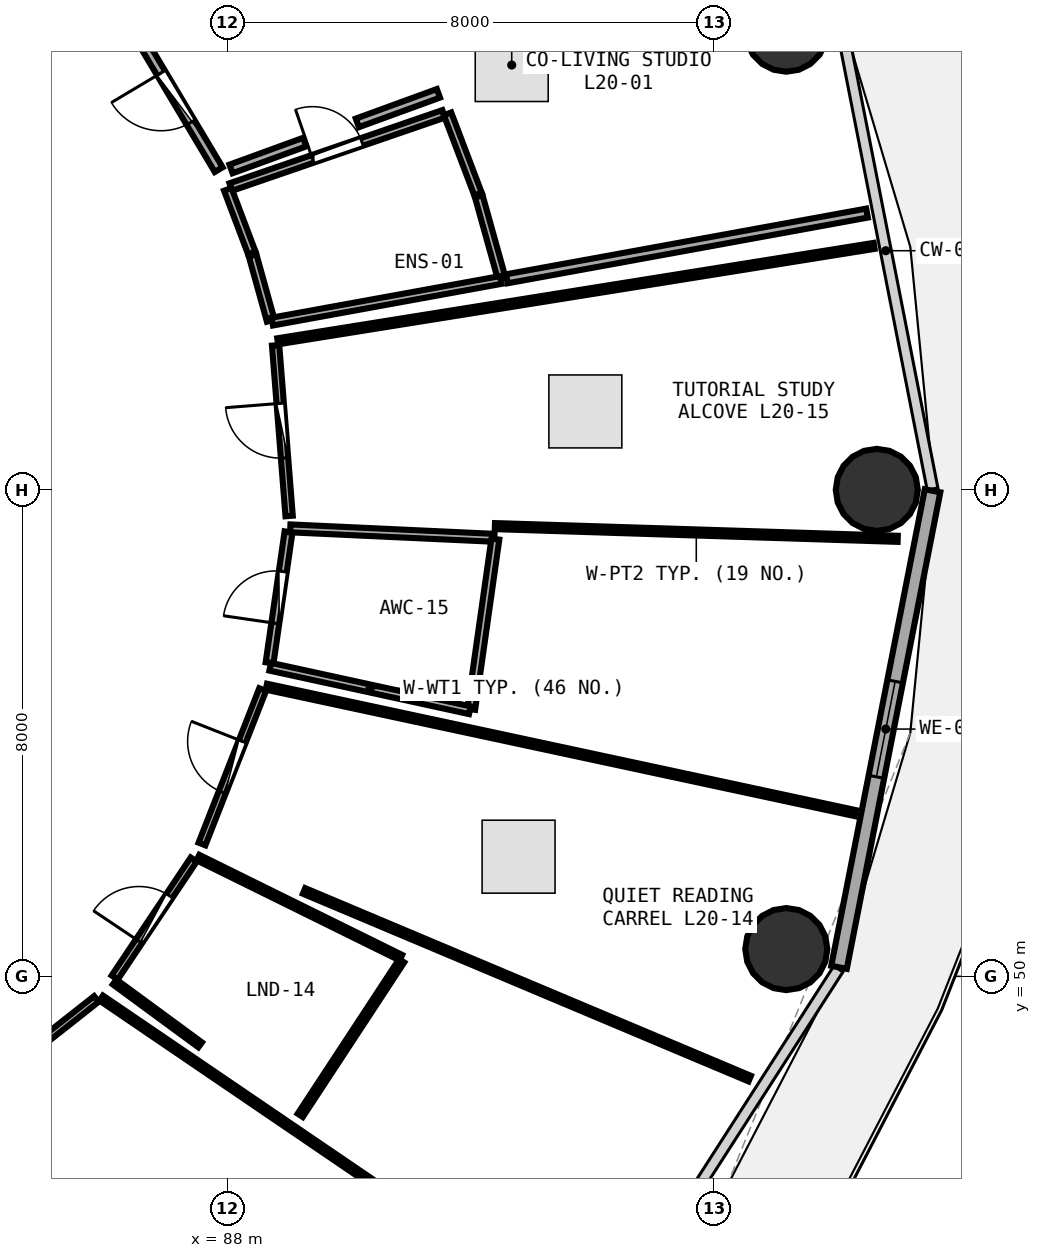
"""IFC4 building model, lengths in metres.
Left out: names, types, materials, properties, quantities, classifications, styles, units other than length and angle.
Written with IfcOpenShell. Run it as: python <this file> out.ifc"""

import sys

from ifc_helpers import new_model, si_unit, direction, frame, frame_2d, origin, origin_2d, place, context, subcontext, project, spatial, rectangle, circle, extrude, element, fill, save


model = new_model("IFC4")
c1 = context("Model", 3, precision=1e-05, world=origin(), true_north=direction((0.0, 1.0)))
c2 = subcontext(c1, "Body", "Model", "MODEL_VIEW")
j1 = project(units=[si_unit("LENGTHUNIT", "METRE"), si_unit("PLANEANGLEUNIT", "RADIAN")], contexts=[c1])
p1 = place(None, origin())
s1 = spatial("IfcSite", under=j1, at=p1, CompositionType="ELEMENT")
p2 = place(p1, origin())
s2 = spatial("IfcBuilding", under=s1, at=p2, CompositionType="ELEMENT")
p3 = place(p2, frame((0.0, 0.0, 80.1)))
s3 = spatial("IfcBuildingStorey", under=s2, at=p3, CompositionType="ELEMENT", Elevation=80.1)
for number, where, z_axis, x_axis in (
    (1, (98.68, 58.0, 0.0), (0.0, 0.0, 1.0), (1.0, 0.0, 0.0)),
    (2, (97.192, 65.552, 0.0), (0.0, 0.0, 1.0), (1.0, 0.0, 0.0)),
    (3, (97.192, 50.448, 0.0), (0.0, 0.0, 1.0), (1.0, 0.0, 0.0)),
):
    element("IfcColumn", number, at=place(p3, frame(where, z_axis=z_axis, x_axis=x_axis)), inside=s3, PredefinedType="COLUMN", context=c2, shape_type="SweptSolid", body=[
        extrude(circle(Radius=0.675, at=origin_2d()), origin(), (0.0, 0.0, 1.0), 3.75),
    ])
p4 = place(p3, frame((98.059, 50.148, 0.0), z_axis=(0.0, 0.0, 1.0), x_axis=(0.192581843632, 0.981280914674, 0.0)))
e4 = element("IfcWall", 4, at=p4, inside=s3, PredefinedType="SOLIDWALL", context=c2, shape_type="SweptSolid", body=[
    extrude(rectangle(XDim=7.987, YDim=0.26, at=frame_2d((3.993, 0.0))), origin(), (0.0, 0.0, 1.0), 3.475),
])
p5 = place(p4, frame((3.193, 0.0, 0.85)))
e5 = element("IfcOpeningElement", 5, at=p5, cuts=e4, PredefinedType="OPENING", context=c2, shape_type="SweptSolid", body=[
    extrude(rectangle(XDim=1.6, YDim=1.45, at=frame_2d((0.8, 0.725))), frame((0.0, 0.14, 0.0), z_axis=(0.0, -1.0, 0.0), x_axis=(1.0, 0.0, 0.0)), (0.0, 0.0, 1.0), 0.28),
])
p6 = place(p3, frame((88.056, 62.98, 0.0), z_axis=(0.0, 0.0, 1.0), x_axis=(0.94570750663, 0.325018940838, 0.0)))
e6 = element("IfcWall", 6, at=p6, inside=s3, PredefinedType="PLUMBINGWALL", context=c2, shape_type="SweptSolid", body=[
    extrude(rectangle(XDim=3.702, YDim=0.13, at=frame_2d((1.851, 0.0))), origin(), (0.0, 0.0, 1.0), 3.175),
])
p7 = place(p6, frame((1.421, 0.0, 0.0)))
e7 = element("IfcOpeningElement", 7, at=p7, cuts=e6, PredefinedType="OPENING", context=c2, shape_type="SweptSolid", body=[
    extrude(rectangle(XDim=0.86, YDim=2.05, at=frame_2d((0.43, 1.025))), frame((0.0, 0.075, 0.0), z_axis=(0.0, -1.0, 0.0), x_axis=(1.0, 0.0, 0.0)), (0.0, 0.0, 1.0), 0.15),
])
p8 = place(p3, frame((87.856, 63.267, 0.0), z_axis=(0.0, 0.0, 1.0), x_axis=(-0.512288635556, 0.858813340535, 0.0)))
e8 = element("IfcWall", 8, at=p8, inside=s3, PredefinedType="PARTITIONING", context=c2, shape_type="SweptSolid", body=[
    extrude(rectangle(XDim=2.751, YDim=0.15, at=frame_2d((1.375, 0.0))), origin(), (0.0, 0.0, 1.0), 2.925),
])
p9 = place(p8, frame((0.901, 0.0, 0.0)))
e9 = element("IfcOpeningElement", 9, at=p9, cuts=e8, PredefinedType="OPENING", context=c2, shape_type="SweptSolid", body=[
    extrude(rectangle(XDim=0.95, YDim=2.08, at=frame_2d((0.475, 1.04))), frame((0.0, 0.085, 0.0), z_axis=(0.0, -1.0, 0.0), x_axis=(1.0, 0.0, 0.0)), (0.0, 0.0, 1.0), 0.17),
])
p10 = place(p3, frame((81.494, 46.198, 0.0), z_axis=(0.0, 0.0, 1.0), x_axis=(0.785315722545, 0.619095482074, 0.0)))
e10 = element("IfcWall", 10, at=p10, inside=s3, PredefinedType="PARTITIONING", context=c2, shape_type="SweptSolid", body=[
    extrude(rectangle(XDim=5.54, YDim=0.12, at=frame_2d((2.77, 0.0))), origin(), (0.0, 0.0, 1.0), 2.925),
])
p11 = place(p10, frame((2.32, 0.0, 0.0)))
e11 = element("IfcOpeningElement", 11, at=p11, cuts=e10, PredefinedType="OPENING", context=c2, shape_type="SweptSolid", body=[
    extrude(rectangle(XDim=0.9, YDim=2.08, at=frame_2d((0.45, 1.04))), frame((0.0, 0.07, 0.0), z_axis=(0.0, -1.0, 0.0), x_axis=(1.0, 0.0, 0.0)), (0.0, 0.0, 1.0), 0.14),
])
p12 = place(p3, frame((86.146, 49.981, 0.0), z_axis=(0.0, 0.0, 1.0), x_axis=(0.556604342457, 0.83077771152, 0.0)))
e12 = element("IfcWall", 12, at=p12, inside=s3, PredefinedType="PARTITIONING", context=c2, shape_type="SweptSolid", body=[
    extrude(rectangle(XDim=2.336, YDim=0.12, at=frame_2d((1.168, 0.0))), origin(), (0.0, 0.0, 1.0), 2.925),
])
p13 = place(p12, frame((0.718, 0.0, 0.0)))
e13 = element("IfcOpeningElement", 13, at=p13, cuts=e12, PredefinedType="OPENING", context=c2, shape_type="SweptSolid", body=[
    extrude(rectangle(XDim=0.9, YDim=2.08, at=frame_2d((0.45, 1.04))), frame((0.0, 0.07, 0.0), z_axis=(0.0, -1.0, 0.0), x_axis=(1.0, 0.0, 0.0)), (0.0, 0.0, 1.0), 0.14),
])
p14 = place(p3, frame((87.582, 52.177, 0.0), z_axis=(0.0, 0.0, 1.0), x_axis=(0.365846135531, 0.930675348936, 0.0)))
e14 = element("IfcWall", 14, at=p14, inside=s3, PredefinedType="PARTITIONING", context=c2, shape_type="SweptSolid", body=[
    extrude(rectangle(XDim=2.729, YDim=0.12, at=frame_2d((1.364, 0.0))), origin(), (0.0, 0.0, 1.0), 3.235),
])
p15 = place(p14, frame((0.914, 0.0, 0.0)))
e15 = element("IfcOpeningElement", 15, at=p15, cuts=e14, PredefinedType="OPENING", context=c2, shape_type="SweptSolid", body=[
    extrude(rectangle(XDim=0.9, YDim=2.08, at=frame_2d((0.45, 1.04))), frame((0.0, 0.07, 0.0), z_axis=(0.0, -1.0, 0.0), x_axis=(1.0, 0.0, 0.0)), (0.0, 0.0, 1.0), 0.14),
])
p16 = place(p3, frame((88.694, 55.156, 0.0), z_axis=(0.0, 0.0, 1.0), x_axis=(0.14330641518, 0.989678367637, 0.0)))
e16 = element("IfcWall", 16, at=p16, inside=s3, PredefinedType="PLUMBINGWALL", context=c2, shape_type="SweptSolid", body=[
    extrude(rectangle(XDim=2.176, YDim=0.13, at=frame_2d((1.088, 0.0))), origin(), (0.0, 0.0, 1.0), 3.48),
])
p17 = place(p16, frame((0.658, 0.0, 0.0)))
e17 = element("IfcOpeningElement", 17, at=p17, cuts=e16, PredefinedType="OPENING", context=c2, shape_type="SweptSolid", body=[
    extrude(rectangle(XDim=0.86, YDim=2.05, at=frame_2d((0.43, 1.025))), frame((0.0, 0.075, 0.0), z_axis=(0.0, -1.0, 0.0), x_axis=(1.0, 0.0, 0.0)), (0.0, 0.0, 1.0), 0.15),
])
p18 = place(p3, frame((89.015, 57.571, 0.0), z_axis=(0.0, 0.0, 1.0), x_axis=(-0.079090310477, 0.996867454975, 0.0)))
e18 = element("IfcWall", 18, at=p18, inside=s3, PredefinedType="PARTITIONING", context=c2, shape_type="SweptSolid", body=[
    extrude(rectangle(XDim=2.815, YDim=0.12, at=frame_2d((1.408, 0.0))), origin(), (0.0, 0.0, 1.0), 2.925),
])
p19 = place(p18, frame((0.958, 0.0, 0.0)))
e19 = element("IfcOpeningElement", 19, at=p19, cuts=e18, PredefinedType="OPENING", context=c2, shape_type="SweptSolid", body=[
    extrude(rectangle(XDim=0.9, YDim=2.08, at=frame_2d((0.45, 1.04))), frame((0.0, 0.07, 0.0), z_axis=(0.0, -1.0, 0.0), x_axis=(1.0, 0.0, 0.0)), (0.0, 0.0, 1.0), 0.14),
])
p20 = place(p3, frame((88.713, 60.783, 0.0), z_axis=(0.0, 0.0, 1.0), x_axis=(-0.267768177699, 0.963483369349, 0.0)))
e20 = element("IfcWall", 20, at=p20, inside=s3, PredefinedType="PLUMBINGWALL", context=c2, shape_type="SweptSolid", body=[
    extrude(rectangle(XDim=1.114, YDim=0.13, at=frame_2d((0.557, 0.0))), origin(), (0.0, 0.0, 1.0), 3.48),
])
p21 = place(p3, frame((88.402, 61.895, 0.0), z_axis=(0.0, 0.0, 1.0), x_axis=(-0.353392089541, 0.935475296868, 0.0)))
e21 = element("IfcWall", 21, at=p21, inside=s3, PredefinedType="PLUMBINGWALL", context=c2, shape_type="SweptSolid", body=[
    extrude(rectangle(XDim=1.12, YDim=0.13, at=frame_2d((0.56, 0.0))), origin(), (0.0, 0.0, 1.0), 3.235),
])
p22 = place(p3, frame((91.62, 64.184, 0.0), z_axis=(0.0, 0.0, 1.0), x_axis=(0.355383981736, -0.934720399652, 0.0)))
e22 = element("IfcWall", 22, at=p22, inside=s3, PredefinedType="PLUMBINGWALL", context=c2, shape_type="SweptSolid", body=[
    extrude(rectangle(XDim=1.412, YDim=0.13, at=frame_2d((0.706, 0.0))), origin(), (0.0, 0.0, 1.0), 3.48),
])
p23 = place(p3, frame((92.135, 62.827, 0.0), z_axis=(0.0, 0.0, 1.0), x_axis=(0.268855284743, -0.963180583206, 0.0)))
e23 = element("IfcWall", 23, at=p23, inside=s3, PredefinedType="PLUMBINGWALL", context=c2, shape_type="SweptSolid", body=[
    extrude(rectangle(XDim=1.403, YDim=0.13, at=frame_2d((0.702, 0.0))), origin(), (0.0, 0.0, 1.0), 3.48),
])
p24 = place(p3, frame((92.497, 61.452, 0.0), z_axis=(0.0, 0.0, 1.0), x_axis=(-0.983811592037, -0.17920589101, 0.0)))
e24 = element("IfcWall", 24, at=p24, inside=s3, PredefinedType="PLUMBINGWALL", context=c2, shape_type="SweptSolid", body=[
    extrude(rectangle(XDim=3.821, YDim=0.13, at=frame_2d((1.911, 0.0))), origin(), (0.0, 0.0, 1.0), 3.175),
])
p25 = place(p3, frame((98.52, 62.552, 0.0), z_axis=(0.0, 0.0, 1.0), x_axis=(-0.983768558102, -0.17944197973, 0.0)))
e25 = element("IfcWall", 25, at=p25, inside=s3, PredefinedType="PARTITIONING", context=c2, shape_type="SweptSolid", body=[
    extrude(rectangle(XDim=6.022, YDim=0.15, at=frame_2d((3.011, 0.0))), origin(), (0.0, 0.0, 1.0), 2.975),
])
p26 = place(p3, frame((91.47, 64.521, 0.0), z_axis=(0.0, 0.0, 1.0), x_axis=(-0.939526959999, -0.342474950084, 0.0)))
e26 = element("IfcWall", 26, at=p26, inside=s3, PredefinedType="PARTITIONING", context=c2, shape_type="SweptSolid", body=[
    extrude(rectangle(XDim=1.419, YDim=0.15, at=frame_2d((0.71, 0.0))), origin(), (0.0, 0.0, 1.0), 3.175),
])
p27 = place(p3, frame((89.272, 63.72, 0.0), z_axis=(0.0, 0.0, 1.0), x_axis=(-0.939522570491, -0.342486991779, 0.0)))
e27 = element("IfcWall", 27, at=p27, inside=s3, PredefinedType="PARTITIONING", context=c2, shape_type="SweptSolid", body=[
    extrude(rectangle(XDim=1.291, YDim=0.15, at=frame_2d((0.646, 0.0))), origin(), (0.0, 0.0, 1.0), 3.235),
])
p28 = place(p3, frame((85.925, 49.643, 0.0), z_axis=(0.0, 0.0, 1.0), x_axis=(0.826688408753, -0.562659999319, 0.0)))
e28 = element("IfcWall", 28, at=p28, inside=s3, PredefinedType="PARTITIONING", context=c2, shape_type="SweptSolid", body=[
    extrude(rectangle(XDim=9.539, YDim=0.1, at=frame_2d((4.77, 0.0))), origin(), (0.0, 0.0, 1.0), 2.975),
])
p29 = place(p3, frame((87.516, 51.953, 0.0), z_axis=(0.0, 0.0, 1.0), x_axis=(0.896816300292, -0.442403123328, 0.0)))
e29 = element("IfcWall", 29, at=p29, inside=s3, PredefinedType="PARTITIONING", context=c2, shape_type="SweptSolid", body=[
    extrude(rectangle(XDim=3.72, YDim=0.1, at=frame_2d((1.86, 0.0))), origin(), (0.0, 0.0, 1.0), 2.925),
])
p30 = place(p3, frame((90.866, 50.257, 0.0), z_axis=(0.0, 0.0, 1.0), x_axis=(-0.548626626693, -0.836067476035, 0.0)))
e30 = element("IfcWall", 30, at=p30, inside=s3, PredefinedType="PARTITIONING", context=c2, shape_type="SweptSolid", body=[
    extrude(rectangle(XDim=3.041, YDim=0.1, at=frame_2d((1.521, 0.0))), origin(), (0.0, 0.0, 1.0), 3.175),
])
p31 = place(p3, frame((87.552, 48.874, 0.0), z_axis=(0.0, 0.0, 1.0), x_axis=(-0.805902241708, 0.592048627065, 0.0)))
e31 = element("IfcWall", 31, at=p31, inside=s3, PredefinedType="PARTITIONING", context=c2, shape_type="SweptSolid", body=[
    extrude(rectangle(XDim=1.746, YDim=0.1, at=frame_2d((0.873, 0.0))), origin(), (0.0, 0.0, 1.0), 3.235),
])
p32 = place(p3, frame((88.641, 54.764, 0.0), z_axis=(0.0, 0.0, 1.0), x_axis=(0.97772336182, -0.209897660187, 0.0)))
e32 = element("IfcWall", 32, at=p32, inside=s3, PredefinedType="PARTITIONING", context=c2, shape_type="SweptSolid", body=[
    extrude(rectangle(XDim=9.906, YDim=0.1, at=frame_2d((4.953, 0.0))), origin(), (0.0, 0.0, 1.0), 2.975),
])
p33 = place(p3, frame((96.59, 48.319, 0.0), z_axis=(0.0, 0.0, 1.0), x_axis=(-0.92163364156, 0.388061117279, 0.0)))
e33 = element("IfcWall", 33, at=p33, inside=s3, PredefinedType="PARTITIONING", context=c2, shape_type="SweptSolid", body=[
    extrude(rectangle(XDim=7.953, YDim=0.1, at=frame_2d((3.977, 0.0))), origin(), (0.0, 0.0, 1.0), 2.925),
])
p34 = place(p3, frame((89.034, 57.367, 0.0), z_axis=(0.0, 0.0, 1.0), x_axis=(0.998931351305, -0.046218560994, 0.0)))
e34 = element("IfcWall", 34, at=p34, inside=s3, PredefinedType="PLUMBINGWALL", context=c2, shape_type="SweptSolid", body=[
    extrude(rectangle(XDim=3.36, YDim=0.13, at=frame_2d((1.68, 0.0))), origin(), (0.0, 0.0, 1.0), 3.175),
])
p35 = place(p3, frame((92.407, 57.191, 0.0), z_axis=(0.0, 0.0, 1.0), x_axis=(-0.140575090878, -0.990070019658, 0.0)))
e35 = element("IfcWall", 35, at=p35, inside=s3, PredefinedType="PLUMBINGWALL", context=c2, shape_type="SweptSolid", body=[
    extrude(rectangle(XDim=2.827, YDim=0.13, at=frame_2d((1.414, 0.0))), origin(), (0.0, 0.0, 1.0), 3.48),
])
p36 = place(p3, frame((91.988, 54.376, 0.0), z_axis=(0.0, 0.0, 1.0), x_axis=(-0.977059488183, 0.212966562048, 0.0)))
e36 = element("IfcWall", 36, at=p36, inside=s3, PredefinedType="PLUMBINGWALL", context=c2, shape_type="SweptSolid", body=[
    extrude(rectangle(XDim=3.36, YDim=0.13, at=frame_2d((1.68, 0.0))), origin(), (0.0, 0.0, 1.0), 3.175),
])
p37 = place(p3, frame((88.827, 60.443, 0.0), z_axis=(0.0, 0.0, 1.0), x_axis=(0.987442472226, 0.157978998742, 0.0)))
e37 = element("IfcWall", 37, at=p37, inside=s3, PredefinedType="PARTITIONING", context=c2, shape_type="SweptSolid", body=[
    extrude(rectangle(XDim=9.934, YDim=0.1, at=frame_2d((4.967, 0.0))), origin(), (0.0, 0.0, 1.0), 2.975),
])
p38 = place(p3, frame((99.024, 57.195, 0.0), z_axis=(0.0, 0.0, 1.0), x_axis=(-0.999502833447, 0.031529128296, 0.0)))
e38 = element("IfcWall", 38, at=p38, inside=s3, PredefinedType="PARTITIONING", context=c2, shape_type="SweptSolid", body=[
    extrude(rectangle(XDim=6.628, YDim=0.1, at=frame_2d((3.314, 0.0))), origin(), (0.0, 0.0, 1.0), 2.975),
])
p39 = place(p5, origin())
e39 = element("IfcWindow", 39, at=p39, inside=s3, PartitioningType="SINGLE_PANEL", PredefinedType="WINDOW", context=c2, shape_type="SweptSolid", body=[
    extrude(rectangle(XDim=1.6, YDim=1.45, at=frame_2d((0.8, 0.725))), frame((0.0, 0.03, 0.0), z_axis=(0.0, -1.0, 0.0), x_axis=(1.0, 0.0, 0.0)), (0.0, 0.0, 1.0), 0.06),
])
fill(e5, e39)
p40 = place(p7, origin())
e40 = element("IfcDoor", 40, at=p40, inside=s3, OperationType="SINGLE_SWING_LEFT", PredefinedType="DOOR", context=c2, shape_type="SweptSolid", body=[
    extrude(rectangle(XDim=0.86, YDim=2.05, at=frame_2d((0.43, 1.025))), frame((0.0, 0.025, 0.0), z_axis=(0.0, -1.0, 0.0), x_axis=(1.0, 0.0, 0.0)), (0.0, 0.0, 1.0), 0.05),
])
fill(e7, e40)
p41 = place(p9, origin())
e41 = element("IfcDoor", 41, at=p41, inside=s3, OperationType="SINGLE_SWING_RIGHT", PredefinedType="DOOR", context=c2, shape_type="SweptSolid", body=[
    extrude(rectangle(XDim=0.95, YDim=2.08, at=frame_2d((0.475, 1.04))), frame((0.0, 0.025, 0.0), z_axis=(0.0, -1.0, 0.0), x_axis=(1.0, 0.0, 0.0)), (0.0, 0.0, 1.0), 0.05),
])
fill(e9, e41)
p42 = place(p13, origin())
e42 = element("IfcDoor", 42, at=p42, inside=s3, OperationType="SINGLE_SWING_LEFT", PredefinedType="DOOR", context=c2, shape_type="SweptSolid", body=[
    extrude(rectangle(XDim=0.9, YDim=2.08, at=frame_2d((0.45, 1.04))), frame((0.0, 0.025, 0.0), z_axis=(0.0, -1.0, 0.0), x_axis=(1.0, 0.0, 0.0)), (0.0, 0.0, 1.0), 0.05),
])
fill(e13, e42)
p43 = place(p15, origin())
e43 = element("IfcDoor", 43, at=p43, inside=s3, OperationType="SINGLE_SWING_RIGHT", PredefinedType="DOOR", context=c2, shape_type="SweptSolid", body=[
    extrude(rectangle(XDim=0.9, YDim=2.08, at=frame_2d((0.45, 1.04))), frame((0.0, 0.025, 0.0), z_axis=(0.0, -1.0, 0.0), x_axis=(1.0, 0.0, 0.0)), (0.0, 0.0, 1.0), 0.05),
])
fill(e15, e43)
p44 = place(p17, origin())
e44 = element("IfcDoor", 44, at=p44, inside=s3, OperationType="SINGLE_SWING_LEFT", PredefinedType="DOOR", context=c2, shape_type="SweptSolid", body=[
    extrude(rectangle(XDim=0.86, YDim=2.05, at=frame_2d((0.43, 1.025))), frame((0.0, 0.025, 0.0), z_axis=(0.0, -1.0, 0.0), x_axis=(1.0, 0.0, 0.0)), (0.0, 0.0, 1.0), 0.05),
])
fill(e17, e44)
p45 = place(p19, origin())
e45 = element("IfcDoor", 45, at=p45, inside=s3, OperationType="SINGLE_SWING_RIGHT", PredefinedType="DOOR", context=c2, shape_type="SweptSolid", body=[
    extrude(rectangle(XDim=0.9, YDim=2.08, at=frame_2d((0.45, 1.04))), frame((0.0, 0.025, 0.0), z_axis=(0.0, -1.0, 0.0), x_axis=(1.0, 0.0, 0.0)), (0.0, 0.0, 1.0), 0.05),
])
fill(e19, e45)
save(model, sys.argv[1])
